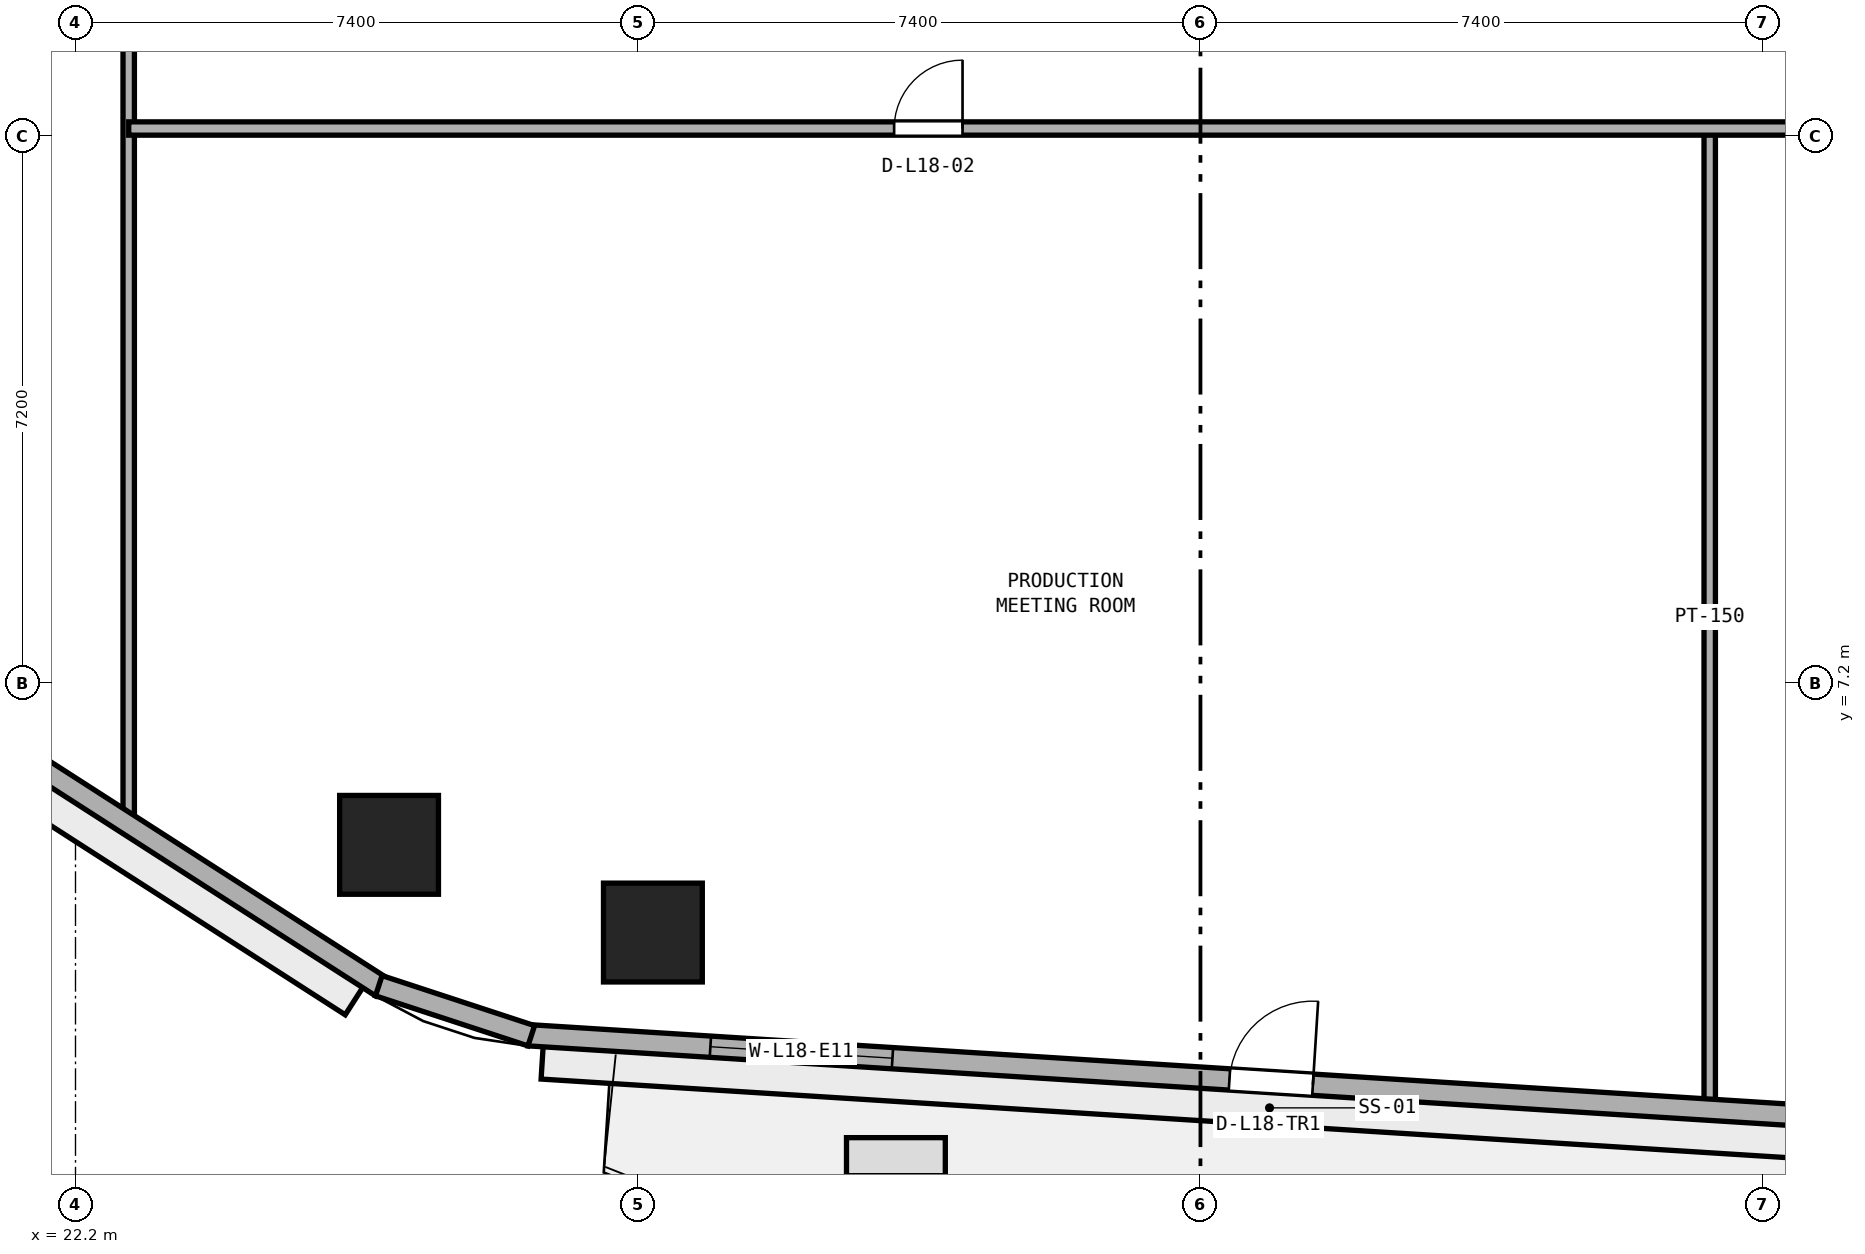
"""IFC4 building model, lengths in metres.
Left out: names, types, materials, properties, quantities, classifications, styles, units other than length and angle.
Written with IfcOpenShell. Run it as: python <this file> out.ifc"""

import sys

from ifc_helpers import new_model, si_unit, direction, frame, frame_2d, origin, origin_2d, place, context, subcontext, project, spatial, rectangle, extrude, element, fill, save


model = new_model("IFC4")
c1 = context("Model", 3, precision=1e-05, world=origin(), true_north=direction((0.0, 1.0)))
c2 = subcontext(c1, "Body", "Model", "MODEL_VIEW")
j1 = project(units=[si_unit("LENGTHUNIT", "METRE"), si_unit("PLANEANGLEUNIT", "RADIAN")], contexts=[c1])
p1 = place(None, origin())
s1 = spatial("IfcSite", under=j1, at=p1, CompositionType="ELEMENT")
p2 = place(p1, origin())
s2 = spatial("IfcBuilding", under=s1, at=p2, CompositionType="ELEMENT")
p3 = place(p2, frame((0.0, 0.0, 74.4)))
s3 = spatial("IfcBuildingStorey", under=s2, at=p3, CompositionType="ELEMENT", Elevation=74.4)
for number, where, z_axis, x_axis in (
    (1, (29.796, 3.922, 0.0), (0.0, 0.0, 1.0), (1.0, 0.0, 0.0)),
    (2, (26.325, 5.076, 0.0), (0.0, 0.0, 1.0), (1.0, 0.0, 0.0)),
):
    element("IfcColumn", number, at=place(p3, frame(where, z_axis=z_axis, x_axis=x_axis)), inside=s3, PredefinedType="COLUMN", context=c2, shape_type="SweptSolid", body=[
        extrude(rectangle(XDim=1.3, YDim=1.3, at=origin_2d()), origin(), (0.0, 0.0, 1.0), 3.8),
    ])
p4 = place(p3, frame((43.7, 1.656, 0.0), z_axis=(0.0, 0.0, 1.0), x_axis=(0.0, 1.0, 0.0)))
e3 = element("IfcWall", 3, at=p4, inside=s3, PredefinedType="PARTITIONING", context=c2, shape_type="SweptSolid", body=[
    extrude(rectangle(XDim=12.844, YDim=0.15, at=frame_2d((6.422, 0.0))), origin(), (0.0, 0.0, 1.0), 3.525),
])
p5 = place(p3, frame((22.9, 5.316, 0.0), z_axis=(0.0, 0.0, 1.0), x_axis=(0.0, 1.0, 0.0)))
e4 = element("IfcWall", 4, at=p5, inside=s3, PredefinedType="PARTITIONING", context=c2, shape_type="SweptSolid", body=[
    extrude(rectangle(XDim=39.555, YDim=0.15, at=frame_2d((19.777, 0.0))), origin(), (0.0, 0.0, 1.0), 3.525),
])
p6 = place(p5, frame((12.135, 0.0, 0.0)))
e5 = element("IfcOpeningElement", 5, at=p6, cuts=e4, PredefinedType="OPENING", context=c2, shape_type="SweptSolid", body=[
    extrude(rectangle(XDim=0.9, YDim=2.1, at=frame_2d((0.45, 1.05))), frame((0.0, 0.085, 0.0), z_axis=(0.0, -1.0, 0.0), x_axis=(1.0, 0.0, 0.0)), (0.0, 0.0, 1.0), 0.17),
])
p7 = place(p5, frame((22.834, 0.0, 0.0)))
e6 = element("IfcOpeningElement", 6, at=p7, cuts=e4, PredefinedType="OPENING", context=c2, shape_type="SweptSolid", body=[
    extrude(rectangle(XDim=0.9, YDim=2.1, at=frame_2d((0.45, 1.05))), frame((0.0, 0.085, 0.0), z_axis=(0.0, -1.0, 0.0), x_axis=(1.0, 0.0, 0.0)), (0.0, 0.0, 1.0), 0.17),
])
p8 = place(p3, frame((22.9, 14.5, 0.0), z_axis=(0.0, 0.0, 1.0), x_axis=(1.0, 0.0, 0.0)))
e7 = element("IfcWall", 7, at=p8, inside=s3, PredefinedType="PARTITIONING", context=c2, shape_type="SweptSolid", body=[
    extrude(rectangle(XDim=28.2, YDim=0.175, at=frame_2d((14.1, 0.0))), origin(), (0.0, 0.0, 1.0), 3.525),
])
p9 = place(p8, frame((10.07, 0.0, 0.0)))
e8 = element("IfcOpeningElement", 8, at=p9, cuts=e7, PredefinedType="OPENING", context=c2, shape_type="SweptSolid", body=[
    extrude(rectangle(XDim=0.9, YDim=2.1, at=frame_2d((0.45, 1.05))), frame((0.0, 0.097, 0.0), z_axis=(0.0, -1.0, 0.0), x_axis=(1.0, 0.0, 0.0)), (0.0, 0.0, 1.0), 0.195),
])
p10 = place(p8, frame((23.93, 0.0, 0.0)))
e9 = element("IfcOpeningElement", 9, at=p10, cuts=e7, PredefinedType="OPENING", context=c2, shape_type="SweptSolid", body=[
    extrude(rectangle(XDim=0.9, YDim=2.1, at=frame_2d((0.45, 1.05))), frame((0.0, 0.097, 0.0), z_axis=(0.0, -1.0, 0.0), x_axis=(1.0, 0.0, 0.0)), (0.0, 0.0, 1.0), 0.195),
])
p11 = place(p3, frame((28.161, 2.571, 0.0), z_axis=(0.0, 0.0, 1.0), x_axis=(0.998017288298, -0.06294038654, 0.0)))
e10 = element("IfcWall", 10, at=p11, inside=s3, PredefinedType="STANDARD", context=c2, shape_type="SweptSolid", body=[
    extrude(rectangle(XDim=19.577, YDim=0.28, at=frame_2d((9.789, 0.0))), origin(), (0.0, 0.0, 1.0), 3.525),
])
p12 = place(p11, frame((9.239, 0.0, 0.0)))
e11 = element("IfcOpeningElement", 11, at=p12, cuts=e10, PredefinedType="OPENING", context=c2, shape_type="SweptSolid", body=[
    extrude(rectangle(XDim=1.1, YDim=2.2, at=frame_2d((0.55, 1.1))), frame((0.0, 0.15, 0.0), z_axis=(0.0, -1.0, 0.0), x_axis=(1.0, 0.0, 0.0)), (0.0, 0.0, 1.0), 0.3),
])
p13 = place(p11, frame((2.396, 0.0, 0.9)))
e12 = element("IfcOpeningElement", 12, at=p13, cuts=e10, PredefinedType="OPENING", context=c2, shape_type="SweptSolid", body=[
    extrude(rectangle(XDim=2.4, YDim=1.75, at=frame_2d((1.2, 0.875))), frame((0.0, 0.15, 0.0), z_axis=(0.0, -1.0, 0.0), x_axis=(1.0, 0.0, 0.0)), (0.0, 0.0, 1.0), 0.3),
])
p14 = place(p3, frame((11.405, 12.728, 0.0), z_axis=(0.0, 0.0, 1.0), x_axis=(0.841304564637, -0.540561402175, 0.0)))
e13 = element("IfcWall", 13, at=p14, inside=s3, PredefinedType="STANDARD", context=c2, shape_type="SweptSolid", body=[
    extrude(rectangle(XDim=17.612, YDim=0.28, at=frame_2d((8.806, 0.0))), origin(), (0.0, 0.0, 1.0), 3.525),
])
p15 = place(p14, frame((2.069, 0.0, 0.9)))
e14 = element("IfcOpeningElement", 14, at=p15, cuts=e13, PredefinedType="OPENING", context=c2, shape_type="SweptSolid", body=[
    extrude(rectangle(XDim=2.4, YDim=1.75, at=frame_2d((1.2, 0.875))), frame((0.0, 0.15, 0.0), z_axis=(0.0, -1.0, 0.0), x_axis=(1.0, 0.0, 0.0)), (0.0, 0.0, 1.0), 0.3),
])
p16 = place(p14, frame((7.606, 0.0, 0.9)))
e15 = element("IfcOpeningElement", 15, at=p16, cuts=e13, PredefinedType="OPENING", context=c2, shape_type="SweptSolid", body=[
    extrude(rectangle(XDim=2.4, YDim=1.75, at=frame_2d((1.2, 0.875))), frame((0.0, 0.15, 0.0), z_axis=(0.0, -1.0, 0.0), x_axis=(1.0, 0.0, 0.0)), (0.0, 0.0, 1.0), 0.3),
])
p17 = place(p3, frame((26.19, 3.223, 0.0), z_axis=(0.0, 0.0, 1.0), x_axis=(0.95016442175, -0.311749212734, 0.0)))
e16 = element("IfcWall", 16, at=p17, inside=s3, PredefinedType="STANDARD", context=c2, shape_type="SweptSolid", body=[
    extrude(rectangle(XDim=2.111, YDim=0.28, at=frame_2d((1.056, 0.0))), origin(), (0.0, 0.0, 1.0), 3.525),
])
p18 = place(p9, origin())
e17 = element("IfcDoor", 17, at=p18, inside=s3, OperationType="SINGLE_SWING_RIGHT", PredefinedType="DOOR", context=c2, shape_type="SweptSolid", body=[
    extrude(rectangle(XDim=0.9, YDim=2.1, at=frame_2d((0.45, 1.05))), frame((0.0, 0.025, 0.0), z_axis=(0.0, -1.0, 0.0), x_axis=(1.0, 0.0, 0.0)), (0.0, 0.0, 1.0), 0.05),
])
fill(e8, e17)
p19 = place(p12, origin())
e18 = element("IfcDoor", 18, at=p19, inside=s3, OperationType="SINGLE_SWING_RIGHT", PredefinedType="DOOR", context=c2, shape_type="SweptSolid", body=[
    extrude(rectangle(XDim=1.1, YDim=2.2, at=frame_2d((0.55, 1.1))), frame((0.0, 0.025, 0.0), z_axis=(0.0, -1.0, 0.0), x_axis=(1.0, 0.0, 0.0)), (0.0, 0.0, 1.0), 0.05),
])
fill(e11, e18)
p20 = place(p13, origin())
e19 = element("IfcWindow", 19, at=p20, inside=s3, PartitioningType="SINGLE_PANEL", PredefinedType="WINDOW", context=c2, shape_type="SweptSolid", body=[
    extrude(rectangle(XDim=2.4, YDim=1.75, at=frame_2d((1.2, 0.875))), frame((0.0, 0.03, 0.0), z_axis=(0.0, -1.0, 0.0), x_axis=(1.0, 0.0, 0.0)), (0.0, 0.0, 1.0), 0.06),
])
fill(e12, e19)
save(model, sys.argv[1])
